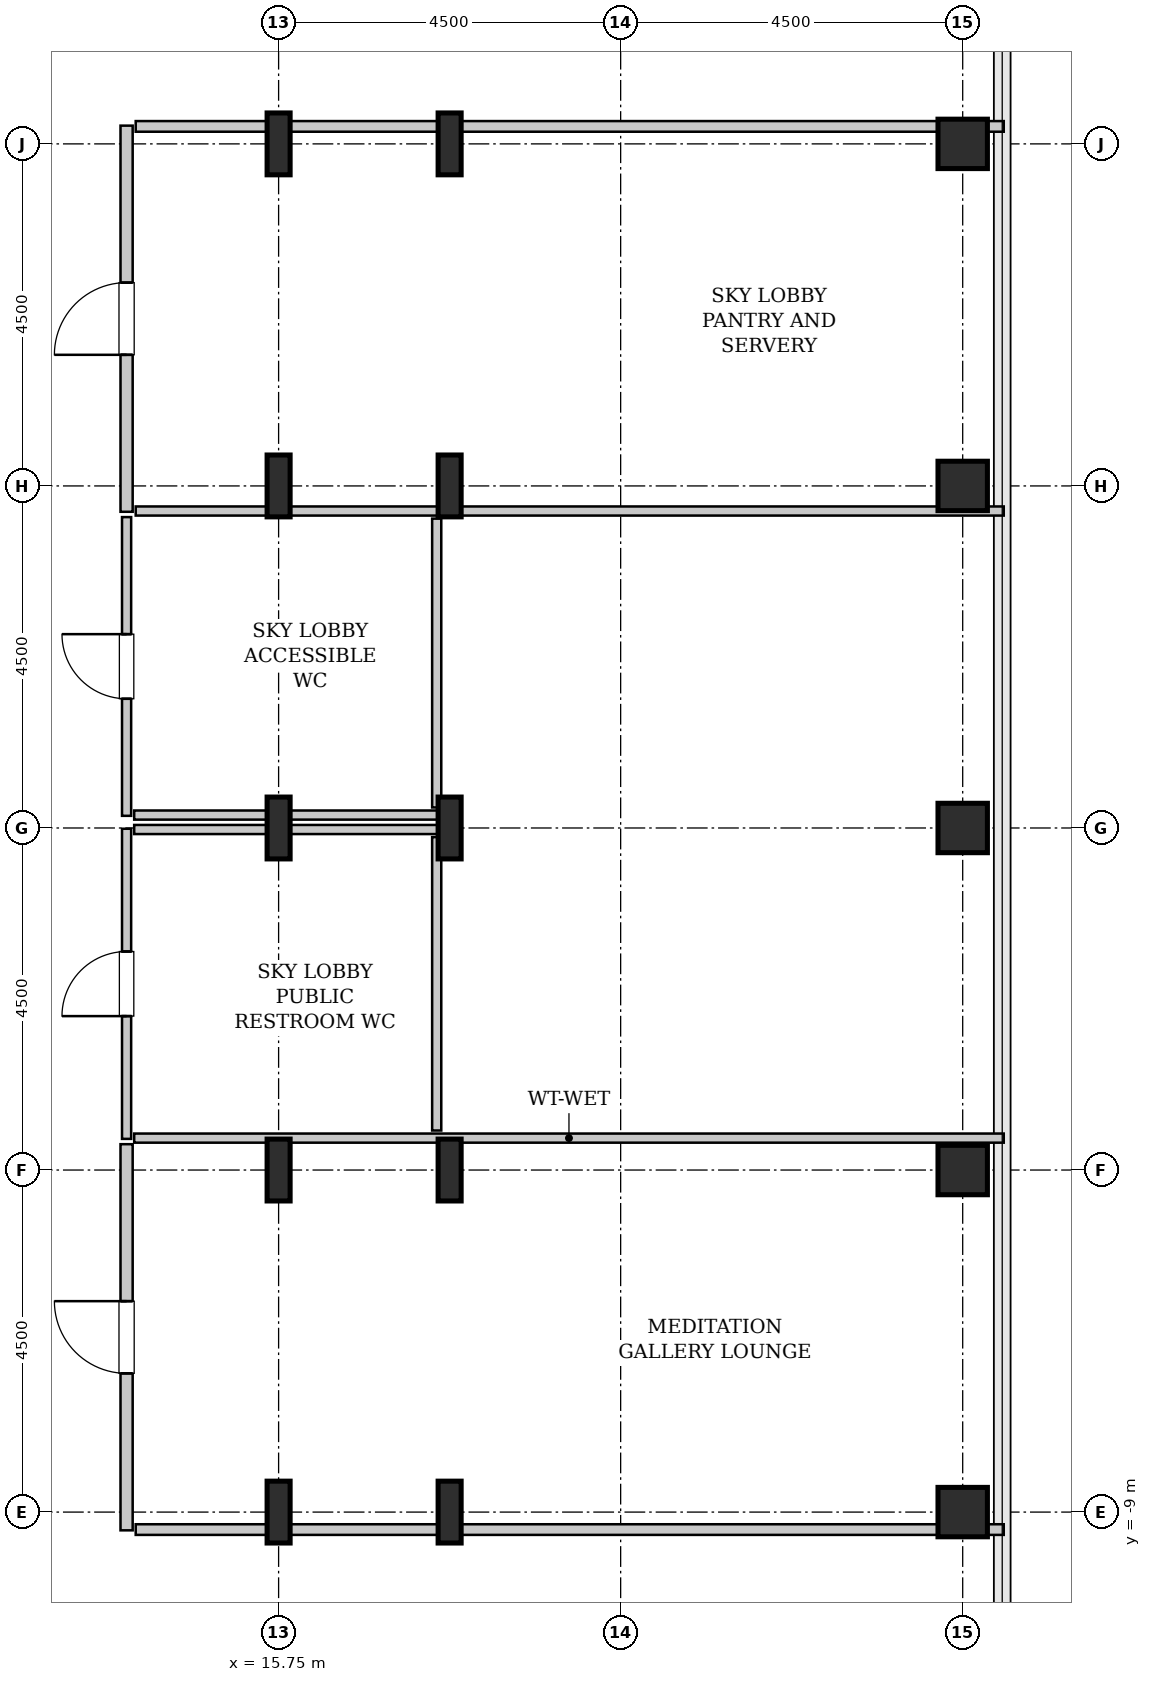
"""IFC4 building model, lengths in metres.
Left out: names, types, materials, properties, quantities, classifications, styles, units other than length and angle.
Written with IfcOpenShell. Run it as: python <this file> out.ifc"""

import sys

from ifc_helpers import new_model, si_unit, direction, frame, frame_2d, origin, origin_2d, place, context, subcontext, project, spatial, rectangle, hollow_rectangle, i_section, extrude, source, transform, mapped, element, fill, save


model = new_model("IFC4")
c1 = context("Model", 3, precision=1e-05, world=origin(), true_north=direction((0.0, 1.0)))
c2 = subcontext(c1, "Body", "Model", "MODEL_VIEW")
j1 = project(units=[si_unit("LENGTHUNIT", "METRE"), si_unit("PLANEANGLEUNIT", "RADIAN")], contexts=[c1])
p1 = place(None, origin())
s1 = spatial("IfcSite", under=j1, at=p1, CompositionType="ELEMENT")
p2 = place(p1, origin())
s2 = spatial("IfcBuilding", under=s1, at=p2, CompositionType="ELEMENT")
p3 = place(p2, frame((0.0, 0.0, 259.8)))
s3 = spatial("IfcBuildingStorey", under=s2, at=p3, CompositionType="ELEMENT", Elevation=259.8)
m1 = source(origin(), c2, "Body", "SweptSolid", [
    extrude(i_section(OverallWidth=0.303, OverallDepth=0.814, WebThickness=0.021, FlangeThickness=0.04, FilletRadius=0.03, at=origin_2d()), origin(), (0.0, 0.0, 1.0), 4.8),
])
for number, where, z_axis, x_axis in (
    (1, (15.75, -9.0, 0.0), (0.0, 0.0, 1.0), (1.0, 0.0, 0.0)),
    (2, (15.75, -4.5, 0.0), (0.0, 0.0, 1.0), (1.0, 0.0, 0.0)),
    (3, (15.75, 0.0, 0.0), (0.0, 0.0, 1.0), (1.0, 0.0, 0.0)),
    (4, (15.75, 4.5, 0.0), (0.0, 0.0, 1.0), (1.0, 0.0, 0.0)),
    (5, (15.75, 9.0, 0.0), (0.0, 0.0, 1.0), (1.0, 0.0, 0.0)),
    (6, (18.0, -9.0, 0.0), (0.0, 0.0, 1.0), (1.0, 0.0, 0.0)),
    (7, (18.0, -4.5, 0.0), (0.0, 0.0, 1.0), (1.0, 0.0, 0.0)),
    (8, (18.0, 0.0, 0.0), (0.0, 0.0, 1.0), (1.0, 0.0, 0.0)),
    (9, (18.0, 4.5, 0.0), (0.0, 0.0, 1.0), (1.0, 0.0, 0.0)),
    (10, (18.0, 9.0, 0.0), (0.0, 0.0, 1.0), (1.0, 0.0, 0.0)),
):
    element("IfcColumn", number, at=place(p3, frame(where, z_axis=z_axis, x_axis=x_axis)), inside=s3, PredefinedType="COLUMN", context=c2, shape_type="MappedRepresentation", body=[
        mapped(m1, transform((0.0, 0.0, 0.0), x_axis=(1.0, 0.0, 0.0), y_axis=(0.0, 1.0, 0.0), z_axis=(0.0, 0.0, 1.0), scale=1.0)),
    ])
m2 = source(origin(), c2, "Body", "SweptSolid", [
    extrude(hollow_rectangle(XDim=0.65, YDim=0.65, WallThickness=0.032, InnerFilletRadius=0.032, OuterFilletRadius=0.064, at=origin_2d()), origin(), (0.0, 0.0, 1.0), 4.8),
])
for number, where, z_axis, x_axis in (
    (11, (24.75, -9.0, 0.0), (0.0, 0.0, 1.0), (1.0, 0.0, 0.0)),
    (12, (24.75, -4.5, 0.0), (0.0, 0.0, 1.0), (1.0, 0.0, 0.0)),
    (13, (24.75, 0.0, 0.0), (0.0, 0.0, 1.0), (1.0, 0.0, 0.0)),
    (14, (24.75, 4.5, 0.0), (0.0, 0.0, 1.0), (1.0, 0.0, 0.0)),
    (15, (24.75, 9.0, 0.0), (0.0, 0.0, 1.0), (1.0, 0.0, 0.0)),
):
    element("IfcColumn", number, at=place(p3, frame(where, z_axis=z_axis, x_axis=x_axis)), inside=s3, PredefinedType="COLUMN", context=c2, shape_type="MappedRepresentation", body=[
        mapped(m2, transform((0.0, 0.0, 0.0), x_axis=(1.0, 0.0, 0.0), y_axis=(0.0, 1.0, 0.0), z_axis=(0.0, 0.0, 1.0), scale=1.0)),
    ])
m3 = source(origin(), c2, "Body", "SweptSolid", [
    extrude(rectangle(XDim=5.08, YDim=0.16, at=frame_2d((2.54, 0.0))), origin(), (0.0, 0.0, 1.0), 4.535),
])
p4 = place(p3, frame((13.75, 4.16, 0.0), z_axis=(0.0, 0.0, 1.0), x_axis=(0.0, 1.0, 0.0)))
e16 = element("IfcWall", 16, at=p4, inside=s3, PredefinedType="PARTITIONING", context=c2, shape_type="MappedRepresentation", body=[
    mapped(m3, transform((0.0, 0.0, 0.0), x_axis=(1.0, 0.0, 0.0), y_axis=(0.0, 1.0, 0.0), z_axis=(0.0, 0.0, 1.0), scale=1.0)),
])
p5 = place(p4, frame((2.065, 0.0, 0.0)))
e17 = element("IfcOpeningElement", 17, at=p5, cuts=e16, PredefinedType="OPENING", context=c2, shape_type="SweptSolid", body=[
    extrude(rectangle(XDim=0.95, YDim=2.1, at=frame_2d((0.475, 1.05))), frame((0.0, 0.09, 0.0), z_axis=(0.0, -1.0, 0.0), x_axis=(1.0, 0.0, 0.0)), (0.0, 0.0, 1.0), 0.18),
])
m4 = source(origin(), c2, "Body", "SweptSolid", [
    extrude(rectangle(XDim=11.42, YDim=0.14, at=frame_2d((5.71, 0.0))), origin(), (0.0, 0.0, 1.0), 3.925),
])
p6 = place(p3, frame((13.87, 9.23, 0.0), z_axis=(0.0, 0.0, 1.0), x_axis=(1.0, 0.0, 0.0)))
e18 = element("IfcWall", 18, at=p6, inside=s3, PredefinedType="PARTITIONING", context=c2, shape_type="MappedRepresentation", body=[
    mapped(m4, transform((0.0, 0.0, 0.0), x_axis=(1.0, 0.0, 0.0), y_axis=(0.0, 1.0, 0.0), z_axis=(0.0, 0.0, 1.0), scale=1.0)),
])
m5 = source(origin(), c2, "Body", "SweptSolid", [
    extrude(rectangle(XDim=11.42, YDim=0.12, at=frame_2d((5.71, 0.0))), origin(), (0.0, 0.0, 1.0), 3.925),
])
p7 = place(p3, frame((13.87, 4.17, 0.0), z_axis=(0.0, 0.0, 1.0), x_axis=(1.0, 0.0, 0.0)))
e19 = element("IfcWall", 19, at=p7, inside=s3, PredefinedType="PLUMBINGWALL", context=c2, shape_type="MappedRepresentation", body=[
    mapped(m5, transform((0.0, 0.0, 0.0), x_axis=(1.0, 0.0, 0.0), y_axis=(0.0, 1.0, 0.0), z_axis=(0.0, 0.0, 1.0), scale=1.0)),
])
m6 = source(origin(), c2, "Body", "SweptSolid", [
    extrude(rectangle(XDim=3.93, YDim=0.12, at=frame_2d((1.965, 0.0))), origin(), (0.0, 0.0, 1.0), 4.535),
])
p8 = place(p3, frame((13.75, 0.16, 0.0), z_axis=(0.0, 0.0, 1.0), x_axis=(0.0, 1.0, 0.0)))
e20 = element("IfcWall", 20, at=p8, inside=s3, PredefinedType="PLUMBINGWALL", context=c2, shape_type="MappedRepresentation", body=[
    mapped(m6, transform((0.0, 0.0, 0.0), x_axis=(1.0, 0.0, 0.0), y_axis=(0.0, 1.0, 0.0), z_axis=(0.0, 0.0, 1.0), scale=1.0)),
])
p9 = place(p8, frame((1.54, 0.0, 0.0)))
e21 = element("IfcOpeningElement", 21, at=p9, cuts=e20, PredefinedType="OPENING", context=c2, shape_type="SweptSolid", body=[
    extrude(rectangle(XDim=0.85, YDim=2.1, at=frame_2d((0.425, 1.05))), frame((0.0, 0.07, 0.0), z_axis=(0.0, -1.0, 0.0), x_axis=(1.0, 0.0, 0.0)), (0.0, 0.0, 1.0), 0.14),
])
m7 = source(origin(), c2, "Body", "SweptSolid", [
    extrude(rectangle(XDim=3.99, YDim=0.12, at=frame_2d((1.995, 0.0))), origin(), (0.0, 0.0, 1.0), 3.925),
])
p10 = place(p3, frame((13.85, 0.17, 0.0), z_axis=(0.0, 0.0, 1.0), x_axis=(1.0, 0.0, 0.0)))
e22 = element("IfcWall", 22, at=p10, inside=s3, PredefinedType="PLUMBINGWALL", context=c2, shape_type="MappedRepresentation", body=[
    mapped(m7, transform((0.0, 0.0, 0.0), x_axis=(1.0, 0.0, 0.0), y_axis=(0.0, 1.0, 0.0), z_axis=(0.0, 0.0, 1.0), scale=1.0)),
])
m8 = source(origin(), c2, "Body", "SweptSolid", [
    extrude(rectangle(XDim=3.8, YDim=0.12, at=frame_2d((1.9, 0.0))), origin(), (0.0, 0.0, 1.0), 3.925),
])
p11 = place(p3, frame((17.83, 0.27, 0.0), z_axis=(0.0, 0.0, 1.0), x_axis=(0.0, 1.0, 0.0)))
e23 = element("IfcWall", 23, at=p11, inside=s3, PredefinedType="PLUMBINGWALL", context=c2, shape_type="MappedRepresentation", body=[
    mapped(m8, transform((0.0, 0.0, 0.0), x_axis=(1.0, 0.0, 0.0), y_axis=(0.0, 1.0, 0.0), z_axis=(0.0, 0.0, 1.0), scale=1.0)),
])
m9 = source(origin(), c2, "Body", "SweptSolid", [
    extrude(rectangle(XDim=4.08, YDim=0.12, at=frame_2d((2.04, 0.0))), origin(), (0.0, 0.0, 1.0), 4.535),
])
p12 = place(p3, frame((13.75, -4.09, 0.0), z_axis=(0.0, 0.0, 1.0), x_axis=(0.0, 1.0, 0.0)))
e24 = element("IfcWall", 24, at=p12, inside=s3, PredefinedType="PLUMBINGWALL", context=c2, shape_type="MappedRepresentation", body=[
    mapped(m9, transform((0.0, 0.0, 0.0), x_axis=(1.0, 0.0, 0.0), y_axis=(0.0, 1.0, 0.0), z_axis=(0.0, 0.0, 1.0), scale=1.0)),
])
p13 = place(p12, frame((1.615, 0.0, 0.0)))
e25 = element("IfcOpeningElement", 25, at=p13, cuts=e24, PredefinedType="OPENING", context=c2, shape_type="SweptSolid", body=[
    extrude(rectangle(XDim=0.85, YDim=2.1, at=frame_2d((0.425, 1.05))), frame((0.0, 0.07, 0.0), z_axis=(0.0, -1.0, 0.0), x_axis=(1.0, 0.0, 0.0)), (0.0, 0.0, 1.0), 0.14),
])
m10 = source(origin(), c2, "Body", "SweptSolid", [
    extrude(rectangle(XDim=11.44, YDim=0.12, at=frame_2d((5.72, 0.0))), origin(), (0.0, 0.0, 1.0), 3.925),
])
p14 = place(p3, frame((13.85, -4.08, 0.0), z_axis=(0.0, 0.0, 1.0), x_axis=(1.0, 0.0, 0.0)))
e26 = element("IfcWall", 26, at=p14, inside=s3, PredefinedType="PLUMBINGWALL", context=c2, shape_type="MappedRepresentation", body=[
    mapped(m10, transform((0.0, 0.0, 0.0), x_axis=(1.0, 0.0, 0.0), y_axis=(0.0, 1.0, 0.0), z_axis=(0.0, 0.0, 1.0), scale=1.0)),
])
p15 = place(p3, frame((13.85, -0.02, 0.0), z_axis=(0.0, 0.0, 1.0), x_axis=(1.0, 0.0, 0.0)))
e27 = element("IfcWall", 27, at=p15, inside=s3, PredefinedType="PLUMBINGWALL", context=c2, shape_type="MappedRepresentation", body=[
    mapped(m7, transform((0.0, 0.0, 0.0), x_axis=(1.0, 0.0, 0.0), y_axis=(0.0, 1.0, 0.0), z_axis=(0.0, 0.0, 1.0), scale=1.0)),
])
m11 = source(origin(), c2, "Body", "SweptSolid", [
    extrude(rectangle(XDim=3.86, YDim=0.12, at=frame_2d((1.93, 0.0))), origin(), (0.0, 0.0, 1.0), 3.925),
])
p16 = place(p3, frame((17.83, -3.98, 0.0), z_axis=(0.0, 0.0, 1.0), x_axis=(0.0, 1.0, 0.0)))
e28 = element("IfcWall", 28, at=p16, inside=s3, PredefinedType="PLUMBINGWALL", context=c2, shape_type="MappedRepresentation", body=[
    mapped(m11, transform((0.0, 0.0, 0.0), x_axis=(1.0, 0.0, 0.0), y_axis=(0.0, 1.0, 0.0), z_axis=(0.0, 0.0, 1.0), scale=1.0)),
])
p17 = place(p3, frame((13.75, -9.24, 0.0), z_axis=(0.0, 0.0, 1.0), x_axis=(0.0, 1.0, 0.0)))
e29 = element("IfcWall", 29, at=p17, inside=s3, PredefinedType="PARTITIONING", context=c2, shape_type="MappedRepresentation", body=[
    mapped(m3, transform((0.0, 0.0, 0.0), x_axis=(1.0, 0.0, 0.0), y_axis=(0.0, 1.0, 0.0), z_axis=(0.0, 0.0, 1.0), scale=1.0)),
])
p18 = place(p17, frame((2.065, 0.0, 0.0)))
e30 = element("IfcOpeningElement", 30, at=p18, cuts=e29, PredefinedType="OPENING", context=c2, shape_type="SweptSolid", body=[
    extrude(rectangle(XDim=0.95, YDim=2.1, at=frame_2d((0.475, 1.05))), frame((0.0, 0.09, 0.0), z_axis=(0.0, -1.0, 0.0), x_axis=(1.0, 0.0, 0.0)), (0.0, 0.0, 1.0), 0.18),
])
p19 = place(p3, frame((13.87, -9.23, 0.0), z_axis=(0.0, 0.0, 1.0), x_axis=(1.0, 0.0, 0.0)))
e31 = element("IfcWall", 31, at=p19, inside=s3, PredefinedType="PARTITIONING", context=c2, shape_type="MappedRepresentation", body=[
    mapped(m4, transform((0.0, 0.0, 0.0), x_axis=(1.0, 0.0, 0.0), y_axis=(0.0, 1.0, 0.0), z_axis=(0.0, 0.0, 1.0), scale=1.0)),
])
m12 = source(origin(), c2, "Body", "SweptSolid", [
    extrude(rectangle(XDim=0.95, YDim=2.1, at=frame_2d((0.475, 1.05))), frame((0.0, 0.025, 0.0), z_axis=(0.0, -1.0, 0.0), x_axis=(1.0, 0.0, 0.0)), (0.0, 0.0, 1.0), 0.05),
])
p20 = place(p5, origin())
e32 = element("IfcDoor", 32, at=p20, inside=s3, OperationType="SINGLE_SWING_LEFT", PredefinedType="DOOR", context=c2, shape_type="MappedRepresentation", body=[
    mapped(m12, transform((0.0, 0.0, 0.0), x_axis=(1.0, 0.0, 0.0), y_axis=(0.0, 1.0, 0.0), z_axis=(0.0, 0.0, 1.0), scale=1.0)),
])
fill(e17, e32)
m13 = source(origin(), c2, "Body", "SweptSolid", [
    extrude(rectangle(XDim=0.85, YDim=2.1, at=frame_2d((0.425, 1.05))), frame((0.0, 0.025, 0.0), z_axis=(0.0, -1.0, 0.0), x_axis=(1.0, 0.0, 0.0)), (0.0, 0.0, 1.0), 0.05),
])
p21 = place(p9, origin())
e33 = element("IfcDoor", 33, at=p21, inside=s3, OperationType="SINGLE_SWING_RIGHT", PredefinedType="DOOR", context=c2, shape_type="MappedRepresentation", body=[
    mapped(m13, transform((0.0, 0.0, 0.0), x_axis=(1.0, 0.0, 0.0), y_axis=(0.0, 1.0, 0.0), z_axis=(0.0, 0.0, 1.0), scale=1.0)),
])
fill(e21, e33)
p22 = place(p13, origin())
e34 = element("IfcDoor", 34, at=p22, inside=s3, OperationType="SINGLE_SWING_LEFT", PredefinedType="DOOR", context=c2, shape_type="MappedRepresentation", body=[
    mapped(m13, transform((0.0, 0.0, 0.0), x_axis=(1.0, 0.0, 0.0), y_axis=(0.0, 1.0, 0.0), z_axis=(0.0, 0.0, 1.0), scale=1.0)),
])
fill(e25, e34)
p23 = place(p18, origin())
e35 = element("IfcDoor", 35, at=p23, inside=s3, OperationType="SINGLE_SWING_RIGHT", PredefinedType="DOOR", context=c2, shape_type="MappedRepresentation", body=[
    mapped(m12, transform((0.0, 0.0, 0.0), x_axis=(1.0, 0.0, 0.0), y_axis=(0.0, 1.0, 0.0), z_axis=(0.0, 0.0, 1.0), scale=1.0)),
])
fill(e30, e35)
save(model, sys.argv[1])
